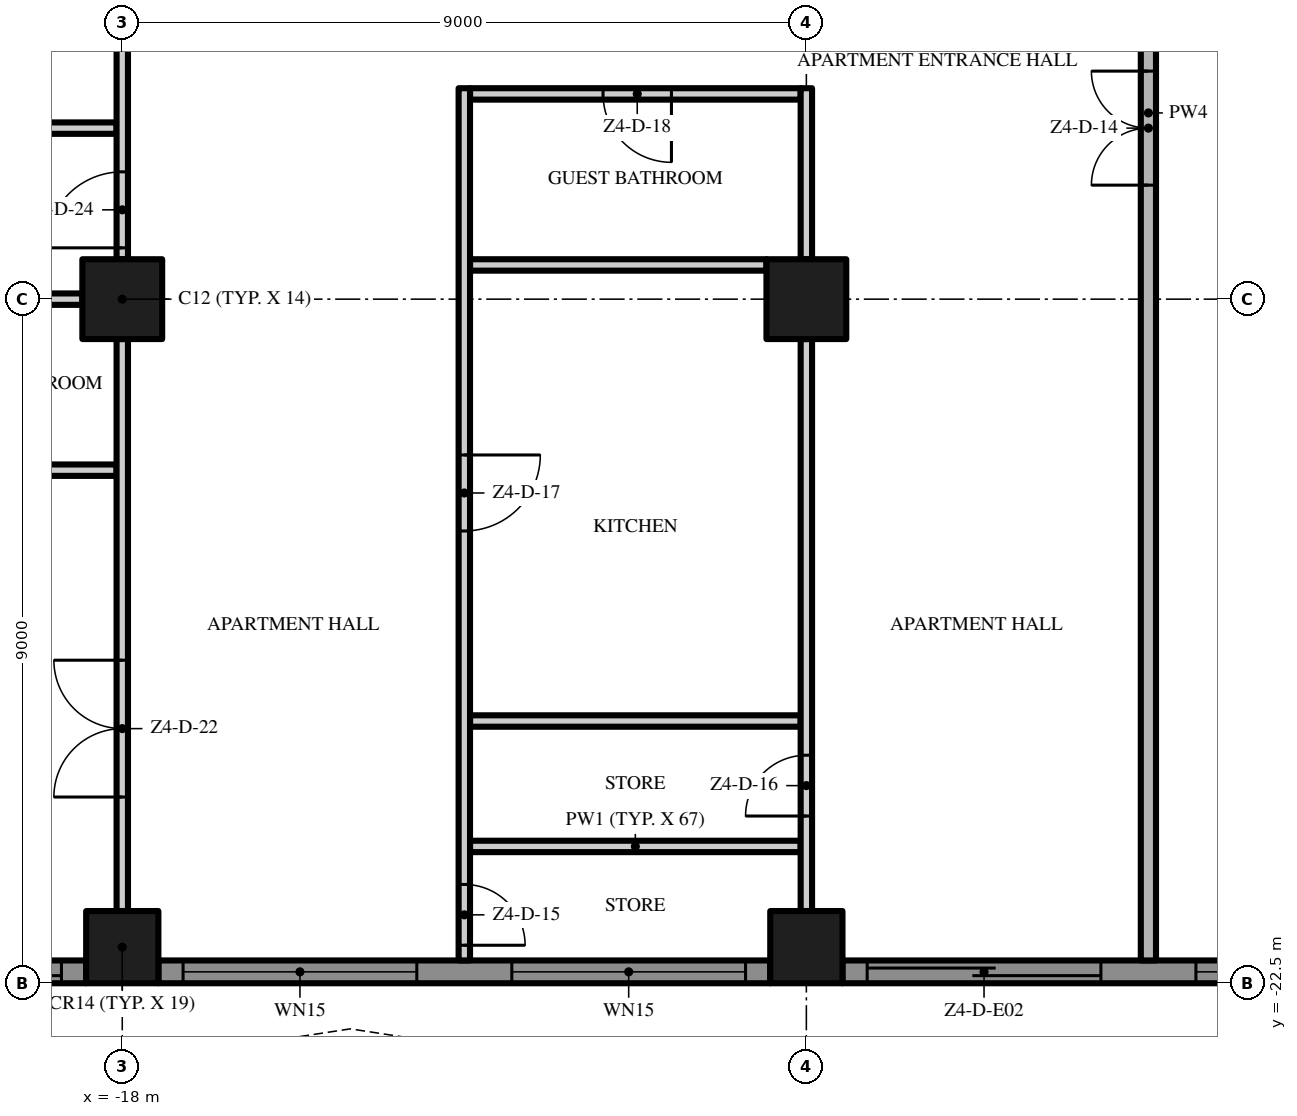
"""IFC4 building model, lengths in metres.
Left out: names, types, materials, properties, quantities, classifications, styles, units other than length and angle.
Written with IfcOpenShell. Run it as: python <this file> out.ifc"""

import sys

from ifc_helpers import new_model, si_unit, direction, frame, frame_2d, origin, origin_2d, place, context, subcontext, project, spatial, polyline, rectangle, outline, extrude, element, fill, save


model = new_model("IFC4")
c1 = context("Model", 3, precision=1e-05, world=origin(), true_north=direction((0.0, 1.0)))
c2 = subcontext(c1, "Body", "Model", "MODEL_VIEW")
j1 = project(units=[si_unit("LENGTHUNIT", "METRE"), si_unit("PLANEANGLEUNIT", "RADIAN")], contexts=[c1])
p1 = place(None, origin())
s1 = spatial("IfcSite", under=j1, at=p1, CompositionType="ELEMENT")
p2 = place(p1, origin())
s2 = spatial("IfcBuilding", under=s1, at=p2, CompositionType="ELEMENT")
p3 = place(p2, frame((0.0, 0.0, 218.6)))
s3 = spatial("IfcBuildingStorey", under=s2, at=p3, CompositionType="ELEMENT", Elevation=218.6)
p4 = place(p3, frame((-18.0, -13.5, 0.0), z_axis=(0.0, 0.0, 1.0), x_axis=(1.0, 0.0, 0.0)))
e1 = element("IfcColumn", 1, at=p4, inside=s3, PredefinedType="COLUMN", context=c2, shape_type="SweptSolid", body=[
    extrude(rectangle(XDim=1.05, YDim=1.05, at=origin_2d()), origin(), (0.0, 0.0, 1.0), 3.5),
])
p5 = place(p3, frame((-18.0, -22.025, 0.0), z_axis=(0.0, 0.0, 1.0), x_axis=(1.0, 0.0, 0.0)))
e2 = element("IfcColumn", 2, at=p5, inside=s3, PredefinedType="COLUMN", context=c2, shape_type="SweptSolid", body=[
    extrude(rectangle(XDim=0.95, YDim=0.95, at=origin_2d()), origin(), (0.0, 0.0, 1.0), 3.5),
])
p6 = place(p3, frame((-9.0, -13.5, 0.0), z_axis=(0.0, 0.0, 1.0), x_axis=(1.0, 0.0, 0.0)))
e3 = element("IfcColumn", 3, at=p6, inside=s3, PredefinedType="COLUMN", context=c2, shape_type="SweptSolid", body=[
    extrude(rectangle(XDim=1.05, YDim=1.05, at=origin_2d()), origin(), (0.0, 0.0, 1.0), 3.5),
])
p7 = place(p3, frame((-9.0, -22.025, 0.0), z_axis=(0.0, 0.0, 1.0), x_axis=(1.0, 0.0, 0.0)))
e4 = element("IfcColumn", 4, at=p7, inside=s3, PredefinedType="COLUMN", context=c2, shape_type="SweptSolid", body=[
    extrude(rectangle(XDim=0.95, YDim=0.95, at=origin_2d()), origin(), (0.0, 0.0, 1.0), 3.5),
])
p8 = place(p3, frame((-18.475, -22.35, 0.0), z_axis=(0.0, 0.0, 1.0), x_axis=(-1.0, 0.0, 0.0)))
e5 = element("IfcWall", 5, at=p8, inside=s3, PredefinedType="SOLIDWALL", context=c2, shape_type="SweptSolid", body=[
    extrude(rectangle(XDim=3.725, YDim=0.3, at=frame_2d((1.863, 0.0))), origin(), (0.0, 0.0, 1.0), 3.5),
])
p9 = place(p8, frame((0.325, 0.0, 0.0)))
e6 = element("IfcOpeningElement", 6, at=p9, cuts=e5, PredefinedType="OPENING", context=c2, shape_type="SweptSolid", body=[
    extrude(rectangle(XDim=3.075, YDim=2.4, at=frame_2d((1.538, 1.2))), frame((0.0, 0.16, 0.0), z_axis=(0.0, -1.0, 0.0), x_axis=(1.0, 0.0, 0.0)), (0.0, 0.0, 1.0), 0.32),
])
p10 = place(p3, frame((-9.475, -22.35, 0.0), z_axis=(0.0, 0.0, 1.0), x_axis=(-1.0, 0.0, 0.0)))
e7 = element("IfcWall", 7, at=p10, inside=s3, PredefinedType="SOLIDWALL", context=c2, shape_type="SweptSolid", body=[
    extrude(rectangle(XDim=8.05, YDim=0.3, at=frame_2d((4.025, 0.0))), origin(), (0.0, 0.0, 1.0), 3.5),
])
p11 = place(p10, frame((4.65, 0.0, 0.45)))
e8 = element("IfcOpeningElement", 8, at=p11, cuts=e7, PredefinedType="OPENING", context=c2, shape_type="SweptSolid", body=[
    extrude(rectangle(XDim=3.075, YDim=2.65, at=frame_2d((1.538, 1.325))), frame((0.0, 0.16, 0.0), z_axis=(0.0, -1.0, 0.0), x_axis=(1.0, 0.0, 0.0)), (0.0, 0.0, 1.0), 0.32),
])
p12 = place(p10, frame((0.325, 0.0, 0.45)))
e9 = element("IfcOpeningElement", 9, at=p12, cuts=e7, PredefinedType="OPENING", context=c2, shape_type="SweptSolid", body=[
    extrude(rectangle(XDim=3.075, YDim=2.65, at=frame_2d((1.538, 1.325))), frame((0.0, 0.16, 0.0), z_axis=(0.0, -1.0, 0.0), x_axis=(1.0, 0.0, 0.0)), (0.0, 0.0, 1.0), 0.32),
])
p13 = place(p3, frame((-0.475, -22.35, 0.0), z_axis=(0.0, 0.0, 1.0), x_axis=(-1.0, 0.0, 0.0)))
e10 = element("IfcWall", 10, at=p13, inside=s3, PredefinedType="SOLIDWALL", context=c2, shape_type="SweptSolid", body=[
    extrude(rectangle(XDim=8.05, YDim=0.3, at=frame_2d((4.025, 0.0))), origin(), (0.0, 0.0, 1.0), 3.5),
])
p14 = place(p13, frame((4.65, 0.0, 0.0)))
e11 = element("IfcOpeningElement", 11, at=p14, cuts=e10, PredefinedType="OPENING", context=c2, shape_type="SweptSolid", body=[
    extrude(rectangle(XDim=3.075, YDim=2.4, at=frame_2d((1.538, 1.2))), frame((0.0, 0.16, 0.0), z_axis=(0.0, -1.0, 0.0), x_axis=(1.0, 0.0, 0.0)), (0.0, 0.0, 1.0), 0.32),
])
p15 = place(p13, frame((0.325, 0.0, 0.45)))
e12 = element("IfcOpeningElement", 12, at=p15, cuts=e10, PredefinedType="OPENING", context=c2, shape_type="SweptSolid", body=[
    extrude(rectangle(XDim=3.075, YDim=2.65, at=frame_2d((1.538, 1.325))), frame((0.0, 0.16, 0.0), z_axis=(0.0, -1.0, 0.0), x_axis=(1.0, 0.0, 0.0)), (0.0, 0.0, 1.0), 0.32),
])
p16 = place(p3, origin())
e13 = element("IfcWall", 13, at=p16, inside=s3, PredefinedType="USERDEFINED", context=c2, shape_type="SweptSolid", body=[
    extrude(outline(polyline([(-22.5, -25.5), (-21.0, -25.271), (-19.5, -24.671), (-18.0, -23.929), (-16.5, -23.329), (-15.0, -23.1), (-13.5, -23.329), (-12.0, -23.929), (-10.5, -24.671), (-9.0, -25.271), (-7.5, -25.5), (-6.0, -25.271), (-4.5, -24.671), (-3.0, -23.929), (-1.5, -23.329), (0.0, -23.1), (1.5, -23.329), (3.0, -23.929), (4.5, -24.671), (6.0, -25.271), (7.5, -25.5), (9.0, -25.271), (10.5, -24.671), (12.0, -23.929), (13.5, -23.329), (15.0, -23.1), (16.5, -23.329), (18.0, -23.929), (19.5, -24.671), (21.0, -25.271), (22.5, -25.5), (22.538, -25.253), (21.066, -25.028), (19.602, -24.442), (18.102, -23.701), (16.566, -23.086), (15.0, -22.847), (13.434, -23.086), (11.898, -23.701), (10.398, -24.442), (8.934, -25.028), (7.5, -25.247), (6.066, -25.028), (4.602, -24.442), (3.102, -23.701), (1.566, -23.086), (0.0, -22.847), (-1.566, -23.086), (-3.102, -23.701), (-4.602, -24.442), (-6.066, -25.028), (-7.5, -25.247), (-8.934, -25.028), (-10.398, -24.442), (-11.898, -23.701), (-13.434, -23.086), (-15.0, -22.847), (-16.566, -23.086), (-18.102, -23.701), (-19.602, -24.442), (-21.066, -25.028), (-22.538, -25.253), (-22.5, -25.5)])), origin(), (0.0, 0.0, 1.0), 0.9),
])
for number, where, z_axis, x_axis in (
    (14, (-13.425, -20.7, 0.0), (0.0, 0.0, 1.0), (1.0, 0.0, 0.0)),
    (15, (-13.425, -19.05, 0.0), (0.0, 0.0, 1.0), (1.0, 0.0, 0.0)),
):
    element("IfcWall", number, at=place(p3, frame(where, z_axis=z_axis, x_axis=x_axis)), inside=s3, PredefinedType="PARTITIONING", context=c2, shape_type="SweptSolid", body=[
        extrude(rectangle(XDim=4.35, YDim=0.15, at=frame_2d((2.175, 0.0))), origin(), (0.0, 0.0, 1.0), 3.5),
    ])
p17 = place(p3, frame((-20.925, -15.75, 0.0), z_axis=(0.0, 0.0, 1.0), x_axis=(1.0, 0.0, 0.0)))
e16 = element("IfcWall", 16, at=p17, inside=s3, PredefinedType="PARTITIONING", context=c2, shape_type="SweptSolid", body=[
    extrude(rectangle(XDim=2.85, YDim=0.15, at=frame_2d((1.425, 0.0))), origin(), (0.0, 0.0, 1.0), 3.5),
])
p18 = place(p3, frame((-26.05, -13.5, 0.0), z_axis=(0.0, 0.0, 1.0), x_axis=(1.0, 0.0, 0.0)))
e17 = element("IfcWall", 17, at=p18, inside=s3, PredefinedType="PARTITIONING", context=c2, shape_type="SweptSolid", body=[
    extrude(rectangle(XDim=7.525, YDim=0.15, at=frame_2d((3.763, 0.0))), origin(), (0.0, 0.0, 1.0), 3.5),
])
p19 = place(p3, frame((-13.425, -13.05, 0.0), z_axis=(0.0, 0.0, 1.0), x_axis=(1.0, 0.0, 0.0)))
e18 = element("IfcWall", 18, at=p19, inside=s3, PredefinedType="PARTITIONING", context=c2, shape_type="SweptSolid", body=[
    extrude(rectangle(XDim=3.9, YDim=0.15, at=frame_2d((1.95, 0.0))), origin(), (0.0, 0.0, 1.0), 3.5),
])
p20 = place(p3, frame((-20.925, -11.25, 0.0), z_axis=(0.0, 0.0, 1.0), x_axis=(1.0, 0.0, 0.0)))
e19 = element("IfcWall", 19, at=p20, inside=s3, PredefinedType="PARTITIONING", context=c2, shape_type="SweptSolid", body=[
    extrude(rectangle(XDim=2.85, YDim=0.15, at=frame_2d((1.425, 0.0))), origin(), (0.0, 0.0, 1.0), 3.5),
])
p21 = place(p3, frame((-9.075, -10.8, 0.0), z_axis=(0.0, 0.0, 1.0), x_axis=(-1.0, 0.0, 0.0)))
e20 = element("IfcWall", 20, at=p21, inside=s3, PredefinedType="PARTITIONING", context=c2, shape_type="SweptSolid", body=[
    extrude(rectangle(XDim=4.35, YDim=0.15, at=frame_2d((2.175, 0.0))), origin(), (0.0, 0.0, 1.0), 3.5),
])
p22 = place(p21, frame((1.7, 0.0, 0.0)))
e21 = element("IfcOpeningElement", 21, at=p22, cuts=e20, PredefinedType="OPENING", context=c2, shape_type="SweptSolid", body=[
    extrude(rectangle(XDim=0.9, YDim=2.1, at=frame_2d((0.45, 1.05))), frame((0.0, 0.085, 0.0), z_axis=(0.0, -1.0, 0.0), x_axis=(1.0, 0.0, 0.0)), (0.0, 0.0, 1.0), 0.17),
])
p23 = place(p3, frame((-18.0, -21.55, 0.0), z_axis=(0.0, 0.0, 1.0), x_axis=(0.0, 1.0, 0.0)))
e22 = element("IfcWall", 22, at=p23, inside=s3, PredefinedType="PARTITIONING", context=c2, shape_type="SweptSolid", body=[
    extrude(rectangle(XDim=7.525, YDim=0.15, at=frame_2d((3.763, 0.0))), origin(), (0.0, 0.0, 1.0), 3.5),
])
p24 = place(p23, frame((1.5, 0.0, 0.0)))
e23 = element("IfcOpeningElement", 23, at=p24, cuts=e22, PredefinedType="OPENING", context=c2, shape_type="SweptSolid", body=[
    extrude(rectangle(XDim=1.8, YDim=2.4, at=frame_2d((0.9, 1.2))), frame((0.0, 0.085, 0.0), z_axis=(0.0, -1.0, 0.0), x_axis=(1.0, 0.0, 0.0)), (0.0, 0.0, 1.0), 0.17),
])
p25 = place(p3, frame((-18.0, -12.975, 0.0), z_axis=(0.0, 0.0, 1.0), x_axis=(0.0, 1.0, 0.0)))
e24 = element("IfcWall", 24, at=p25, inside=s3, PredefinedType="PARTITIONING", context=c2, shape_type="SweptSolid", body=[
    extrude(rectangle(XDim=7.95, YDim=0.15, at=frame_2d((3.975, 0.0))), origin(), (0.0, 0.0, 1.0), 3.5),
])
p26 = place(p25, frame((0.15, 0.0, 0.0)))
e25 = element("IfcOpeningElement", 25, at=p26, cuts=e24, PredefinedType="OPENING", context=c2, shape_type="SweptSolid", body=[
    extrude(rectangle(XDim=1.0, YDim=2.4, at=frame_2d((0.5, 1.2))), frame((0.0, 0.085, 0.0), z_axis=(0.0, -1.0, 0.0), x_axis=(1.0, 0.0, 0.0)), (0.0, 0.0, 1.0), 0.17),
])
p27 = place(p25, frame((6.8, 0.0, 0.0)))
e26 = element("IfcOpeningElement", 26, at=p27, cuts=e24, PredefinedType="OPENING", context=c2, shape_type="SweptSolid", body=[
    extrude(rectangle(XDim=1.0, YDim=2.4, at=frame_2d((0.5, 1.2))), frame((0.0, 0.085, 0.0), z_axis=(0.0, -1.0, 0.0), x_axis=(1.0, 0.0, 0.0)), (0.0, 0.0, 1.0), 0.17),
])
p28 = place(p3, frame((-13.5, -10.725, 0.0), z_axis=(0.0, 0.0, 1.0), x_axis=(0.0, -1.0, 0.0)))
e27 = element("IfcWall", 27, at=p28, inside=s3, PredefinedType="PARTITIONING", context=c2, shape_type="SweptSolid", body=[
    extrude(rectangle(XDim=11.475, YDim=0.15, at=frame_2d((5.737, 0.0))), origin(), (0.0, 0.0, 1.0), 3.5),
])
p29 = place(p28, frame((10.475, 0.0, 0.0)))
e28 = element("IfcOpeningElement", 28, at=p29, cuts=e27, PredefinedType="OPENING", context=c2, shape_type="SweptSolid", body=[
    extrude(rectangle(XDim=0.8, YDim=2.0, at=frame_2d((0.4, 1.0))), frame((0.0, 0.085, 0.0), z_axis=(0.0, -1.0, 0.0), x_axis=(1.0, 0.0, 0.0)), (0.0, 0.0, 1.0), 0.17),
])
p30 = place(p28, frame((4.825, 0.0, 0.0)))
e29 = element("IfcOpeningElement", 29, at=p30, cuts=e27, PredefinedType="OPENING", context=c2, shape_type="SweptSolid", body=[
    extrude(rectangle(XDim=1.0, YDim=2.4, at=frame_2d((0.5, 1.2))), frame((0.0, 0.085, 0.0), z_axis=(0.0, -1.0, 0.0), x_axis=(1.0, 0.0, 0.0)), (0.0, 0.0, 1.0), 0.17),
])
p31 = place(p3, frame((-9.0, -21.55, 0.0), z_axis=(0.0, 0.0, 1.0), x_axis=(0.0, 1.0, 0.0)))
e30 = element("IfcWall", 30, at=p31, inside=s3, PredefinedType="PARTITIONING", context=c2, shape_type="SweptSolid", body=[
    extrude(rectangle(XDim=7.525, YDim=0.15, at=frame_2d((3.763, 0.0))), origin(), (0.0, 0.0, 1.0), 3.5),
])
p32 = place(p31, frame((1.25, 0.0, 0.0)))
e31 = element("IfcOpeningElement", 31, at=p32, cuts=e30, PredefinedType="OPENING", context=c2, shape_type="SweptSolid", body=[
    extrude(rectangle(XDim=0.8, YDim=2.0, at=frame_2d((0.4, 1.0))), frame((0.0, 0.085, 0.0), z_axis=(0.0, -1.0, 0.0), x_axis=(1.0, 0.0, 0.0)), (0.0, 0.0, 1.0), 0.17),
])
p33 = place(p3, frame((-9.0, -12.975, 0.0), z_axis=(0.0, 0.0, 1.0), x_axis=(0.0, 1.0, 0.0)))
e32 = element("IfcWall", 32, at=p33, inside=s3, PredefinedType="PARTITIONING", context=c2, shape_type="SweptSolid", body=[
    extrude(rectangle(XDim=2.25, YDim=0.15, at=frame_2d((1.125, 0.0))), origin(), (0.0, 0.0, 1.0), 3.5),
])
p34 = place(p3, frame((-4.5, -22.2, 0.0), z_axis=(0.0, 0.0, 1.0), x_axis=(0.0, 1.0, 0.0)))
e33 = element("IfcWall", 33, at=p34, inside=s3, PredefinedType="PARTITIONING", context=c2, shape_type="SweptSolid", body=[
    extrude(rectangle(XDim=22.3, YDim=0.2, at=frame_2d((11.15, 0.0))), origin(), (0.0, 0.0, 1.0), 3.5),
])
p35 = place(p34, frame((10.2, 0.0, 0.0)))
e34 = element("IfcOpeningElement", 34, at=p35, cuts=e33, PredefinedType="OPENING", context=c2, shape_type="SweptSolid", body=[
    extrude(rectangle(XDim=1.5, YDim=2.4, at=frame_2d((0.75, 1.2))), frame((0.0, 0.11, 0.0), z_axis=(0.0, -1.0, 0.0), x_axis=(1.0, 0.0, 0.0)), (0.0, 0.0, 1.0), 0.22),
])
p36 = place(p9, origin())
e35 = element("IfcDoor", 35, at=p36, inside=s3, OperationType="SINGLE_SWING_LEFT", PredefinedType="DOOR", context=c2, shape_type="SweptSolid", body=[
    extrude(rectangle(XDim=3.075, YDim=2.4, at=frame_2d((1.538, 1.2))), frame((0.0, 0.025, 0.0), z_axis=(0.0, -1.0, 0.0), x_axis=(1.0, 0.0, 0.0)), (0.0, 0.0, 1.0), 0.05),
])
fill(e6, e35)
p37 = place(p11, origin())
e36 = element("IfcWindow", 36, at=p37, inside=s3, PartitioningType="SINGLE_PANEL", PredefinedType="WINDOW", context=c2, shape_type="SweptSolid", body=[
    extrude(rectangle(XDim=3.075, YDim=2.65, at=frame_2d((1.538, 1.325))), frame((0.0, 0.03, 0.0), z_axis=(0.0, -1.0, 0.0), x_axis=(1.0, 0.0, 0.0)), (0.0, 0.0, 1.0), 0.06),
])
fill(e8, e36)
p38 = place(p12, origin())
e37 = element("IfcWindow", 37, at=p38, inside=s3, PartitioningType="SINGLE_PANEL", PredefinedType="WINDOW", context=c2, shape_type="SweptSolid", body=[
    extrude(rectangle(XDim=3.075, YDim=2.65, at=frame_2d((1.538, 1.325))), frame((0.0, 0.03, 0.0), z_axis=(0.0, -1.0, 0.0), x_axis=(1.0, 0.0, 0.0)), (0.0, 0.0, 1.0), 0.06),
])
fill(e9, e37)
p39 = place(p14, origin())
e38 = element("IfcDoor", 38, at=p39, inside=s3, OperationType="SINGLE_SWING_LEFT", PredefinedType="DOOR", context=c2, shape_type="SweptSolid", body=[
    extrude(rectangle(XDim=3.075, YDim=2.4, at=frame_2d((1.538, 1.2))), frame((0.0, 0.025, 0.0), z_axis=(0.0, -1.0, 0.0), x_axis=(1.0, 0.0, 0.0)), (0.0, 0.0, 1.0), 0.05),
])
fill(e11, e38)
p40 = place(p15, origin())
e39 = element("IfcWindow", 39, at=p40, inside=s3, PartitioningType="SINGLE_PANEL", PredefinedType="WINDOW", context=c2, shape_type="SweptSolid", body=[
    extrude(rectangle(XDim=3.075, YDim=2.65, at=frame_2d((1.538, 1.325))), frame((0.0, 0.03, 0.0), z_axis=(0.0, -1.0, 0.0), x_axis=(1.0, 0.0, 0.0)), (0.0, 0.0, 1.0), 0.06),
])
fill(e12, e39)
p41 = place(p35, origin())
e40 = element("IfcDoor", 40, at=p41, inside=s3, OperationType="DOUBLE_DOOR_SINGLE_SWING", PredefinedType="DOOR", context=c2, shape_type="SweptSolid", body=[
    extrude(rectangle(XDim=1.5, YDim=2.4, at=frame_2d((0.75, 1.2))), frame((0.0, 0.025, 0.0), z_axis=(0.0, -1.0, 0.0), x_axis=(1.0, 0.0, 0.0)), (0.0, 0.0, 1.0), 0.05),
])
fill(e34, e40)
p42 = place(p29, origin())
e41 = element("IfcDoor", 41, at=p42, inside=s3, OperationType="SINGLE_SWING_RIGHT", PredefinedType="DOOR", context=c2, shape_type="SweptSolid", body=[
    extrude(rectangle(XDim=0.8, YDim=2.0, at=frame_2d((0.4, 1.0))), frame((0.0, 0.025, 0.0), z_axis=(0.0, -1.0, 0.0), x_axis=(1.0, 0.0, 0.0)), (0.0, 0.0, 1.0), 0.05),
])
fill(e28, e41)
p43 = place(p32, origin())
e42 = element("IfcDoor", 42, at=p43, inside=s3, OperationType="SINGLE_SWING_LEFT", PredefinedType="DOOR", context=c2, shape_type="SweptSolid", body=[
    extrude(rectangle(XDim=0.8, YDim=2.0, at=frame_2d((0.4, 1.0))), frame((0.0, 0.025, 0.0), z_axis=(0.0, -1.0, 0.0), x_axis=(1.0, 0.0, 0.0)), (0.0, 0.0, 1.0), 0.05),
])
fill(e31, e42)
p44 = place(p30, origin())
e43 = element("IfcDoor", 43, at=p44, inside=s3, OperationType="SINGLE_SWING_LEFT", PredefinedType="DOOR", context=c2, shape_type="SweptSolid", body=[
    extrude(rectangle(XDim=1.0, YDim=2.4, at=frame_2d((0.5, 1.2))), frame((0.0, 0.025, 0.0), z_axis=(0.0, -1.0, 0.0), x_axis=(1.0, 0.0, 0.0)), (0.0, 0.0, 1.0), 0.05),
])
fill(e29, e43)
p45 = place(p22, origin())
e44 = element("IfcDoor", 44, at=p45, inside=s3, OperationType="SINGLE_SWING_LEFT", PredefinedType="DOOR", context=c2, shape_type="SweptSolid", body=[
    extrude(rectangle(XDim=0.9, YDim=2.1, at=frame_2d((0.45, 1.05))), frame((0.0, 0.025, 0.0), z_axis=(0.0, -1.0, 0.0), x_axis=(1.0, 0.0, 0.0)), (0.0, 0.0, 1.0), 0.05),
])
fill(e21, e44)
p46 = place(p24, origin())
e45 = element("IfcDoor", 45, at=p46, inside=s3, OperationType="DOUBLE_DOOR_SINGLE_SWING", PredefinedType="DOOR", context=c2, shape_type="SweptSolid", body=[
    extrude(rectangle(XDim=1.8, YDim=2.4, at=frame_2d((0.9, 1.2))), frame((0.0, 0.025, 0.0), z_axis=(0.0, -1.0, 0.0), x_axis=(1.0, 0.0, 0.0)), (0.0, 0.0, 1.0), 0.05),
])
fill(e23, e45)
p47 = place(p26, origin())
e46 = element("IfcDoor", 46, at=p47, inside=s3, OperationType="SINGLE_SWING_LEFT", PredefinedType="DOOR", context=c2, shape_type="SweptSolid", body=[
    extrude(rectangle(XDim=1.0, YDim=2.4, at=frame_2d((0.5, 1.2))), frame((0.0, 0.025, 0.0), z_axis=(0.0, -1.0, 0.0), x_axis=(1.0, 0.0, 0.0)), (0.0, 0.0, 1.0), 0.05),
])
fill(e25, e46)
save(model, sys.argv[1])
